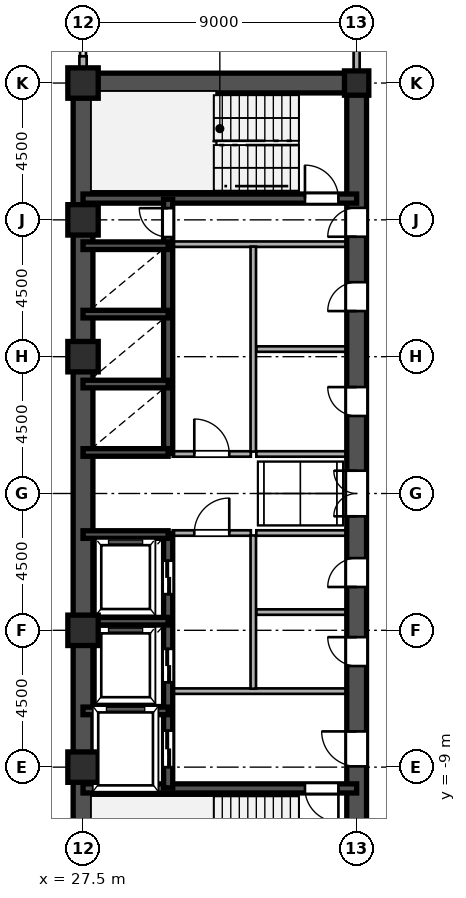
"""IFC4 building model, lengths in metres.
Left out: names, types, materials, properties, quantities, classifications, styles, units other than length and angle.
Written with IfcOpenShell. Run it as: python <this file> out.ifc"""

import sys

from ifc_helpers import new_model, si_unit, direction, frame, frame_2d, origin, origin_2d, place, context, subcontext, project, spatial, rectangle, hollow_rectangle, i_section, extrude, source, transform, mapped, element, fill, save


model = new_model("IFC4")
c1 = context("Model", 3, precision=1e-05, world=origin(), true_north=direction((0.0, 1.0)))
c2 = subcontext(c1, "Body", "Model", "MODEL_VIEW")
j1 = project(units=[si_unit("LENGTHUNIT", "METRE"), si_unit("PLANEANGLEUNIT", "RADIAN")], contexts=[c1])
p1 = place(None, origin())
s1 = spatial("IfcSite", under=j1, at=p1, CompositionType="ELEMENT")
p2 = place(p1, origin())
s2 = spatial("IfcBuilding", under=s1, at=p2, CompositionType="ELEMENT")
p3 = place(p2, frame((0.0, 0.0, 96.0)))
s3 = spatial("IfcBuildingStorey", under=s2, at=p3, CompositionType="ELEMENT", Elevation=96.0)
m1 = source(origin(), c2, "Body", "SweptSolid", [
    extrude(hollow_rectangle(XDim=1.0, YDim=1.0, WallThickness=0.042, at=origin_2d()), origin(), (0.0, 0.0, 1.0), 3.6),
])
for number, where, z_axis, x_axis in (
    (1, (27.5, -9.0, 0.0), (0.0, 0.0, 1.0), (1.0, 0.0, 0.0)),
    (2, (27.5, -4.5, 0.0), (0.0, 0.0, 1.0), (1.0, 0.0, 0.0)),
    (3, (27.5, 4.5, 0.0), (0.0, 0.0, 1.0), (1.0, 0.0, 0.0)),
    (4, (27.5, 9.0, 0.0), (0.0, 0.0, 1.0), (1.0, 0.0, 0.0)),
    (5, (27.5, 13.5, 0.0), (0.0, 0.0, 1.0), (1.0, 0.0, 0.0)),
):
    element("IfcColumn", number, at=place(p3, frame(where, z_axis=z_axis, x_axis=x_axis)), inside=s3, PredefinedType="COLUMN", context=c2, shape_type="MappedRepresentation", body=[
        mapped(m1, transform((0.0, 0.0, 0.0), scale=1.0)),
    ])
m2 = source(origin(), c2, "Body", "SweptSolid", [
    extrude(i_section(OverallWidth=0.8, OverallDepth=0.8, WebThickness=0.032, FlangeThickness=0.05, at=origin_2d()), origin(), (0.0, 0.0, 1.0), 3.6),
])
p4 = place(p3, frame((36.5, 13.5, 0.0), z_axis=(0.0, 0.0, 1.0), x_axis=(1.0, 0.0, 0.0)))
e6 = element("IfcColumn", 6, at=p4, inside=s3, PredefinedType="COLUMN", context=c2, shape_type="MappedRepresentation", body=[
    mapped(m2, transform((0.0, 0.0, 0.0), scale=1.0)),
])
p5 = place(p3, frame((27.5, 13.83, 0.0), z_axis=(0.0, 0.0, 1.0), x_axis=(0.0, 1.0, 0.0)))
e7 = element("IfcWall", 7, at=p5, inside=s3, PredefinedType="SOLIDWALL", context=c2, shape_type="SweptSolid", body=[
    extrude(rectangle(XDim=0.55, YDim=0.24, at=frame_2d((0.275, 0.0))), origin(), (0.0, 0.0, 1.0), 2.88),
])
for number, where, z_axis, x_axis in (
    (8, (27.5, -13.5, 0.0), (0.0, 0.0, 1.0), (0.0, 1.0, 0.0)),
    (9, (27.5, 1.3, 0.0), (0.0, 0.0, 1.0), (0.0, 1.0, 0.0)),
):
    element("IfcWall", number, at=place(p3, frame(where, z_axis=z_axis, x_axis=x_axis)), inside=s3, PredefinedType="SHEAR", context=c2, shape_type="SweptSolid", body=[
        extrude(rectangle(XDim=12.2, YDim=0.65, at=frame_2d((6.1, 0.0))), origin(), (0.0, 0.0, 1.0), 3.38),
    ])
p6 = place(p3, frame((27.5, -1.3, 0.0), z_axis=(0.0, 0.0, 1.0), x_axis=(0.0, 1.0, 0.0)))
e10 = element("IfcWall", 10, at=p6, inside=s3, PredefinedType="SHEAR", context=c2, shape_type="SweptSolid", body=[
    extrude(rectangle(XDim=2.6, YDim=0.65, at=frame_2d((1.3, 0.0))), origin(), (0.0, 0.0, 1.0), 3.38),
])
p7 = place(p3, frame((27.5, 13.5, 0.0), z_axis=(0.0, 0.0, 1.0), x_axis=(1.0, 0.0, 0.0)))
e11 = element("IfcWall", 11, at=p7, inside=s3, PredefinedType="SHEAR", context=c2, shape_type="SweptSolid", body=[
    extrude(rectangle(XDim=9.0, YDim=0.65, at=frame_2d((4.5, 0.0))), origin(), (0.0, 0.0, 1.0), 3.38),
])
p8 = place(p3, frame((36.5, -13.65, 0.0), z_axis=(0.0, 0.0, 1.0), x_axis=(0.0, 1.0, 0.0)))
e12 = element("IfcWall", 12, at=p8, inside=s3, PredefinedType="SHEAR", context=c2, shape_type="SweptSolid", body=[
    extrude(rectangle(XDim=7.15, YDim=0.65, at=frame_2d((3.575, 0.0))), origin(), (0.0, 0.0, 1.0), 3.38),
])
p9 = place(p8, frame((4.675, 0.0, 0.0)))
e13 = element("IfcOpeningElement", 13, at=p9, cuts=e12, PredefinedType="OPENING", context=c2, shape_type="SweptSolid", body=[
    extrude(rectangle(XDim=1.15, YDim=2.2, at=frame_2d((0.575, 1.1))), frame((0.0, 0.335, 0.0), z_axis=(0.0, -1.0, 0.0), x_axis=(1.0, 0.0, 0.0)), (0.0, 0.0, 1.0), 0.67),
])
p10 = place(p3, frame((36.5, -1.3, 0.0), z_axis=(0.0, 0.0, 1.0), x_axis=(0.0, 1.0, 0.0)))
e14 = element("IfcWall", 14, at=p10, inside=s3, PredefinedType="SHEAR", context=c2, shape_type="SweptSolid", body=[
    extrude(rectangle(XDim=2.6, YDim=0.65, at=frame_2d((1.3, 0.0))), origin(), (0.0, 0.0, 1.0), 3.38),
])
p11 = place(p10, frame((0.55, 0.0, 0.0)))
e15 = element("IfcOpeningElement", 15, at=p11, cuts=e14, PredefinedType="OPENING", context=c2, shape_type="SweptSolid", body=[
    extrude(rectangle(XDim=1.5, YDim=2.3, at=frame_2d((0.75, 1.15))), frame((0.0, 0.335, 0.0), z_axis=(0.0, -1.0, 0.0), x_axis=(1.0, 0.0, 0.0)), (0.0, 0.0, 1.0), 0.67),
])
p12 = place(p3, frame((36.5, 8.2, 0.0), z_axis=(0.0, 0.0, 1.0), x_axis=(0.0, 1.0, 0.0)))
e16 = element("IfcWall", 16, at=p12, inside=s3, PredefinedType="SHEAR", context=c2, shape_type="SweptSolid", body=[
    extrude(rectangle(XDim=5.45, YDim=0.65, at=frame_2d((2.725, 0.0))), origin(), (0.0, 0.0, 1.0), 3.38),
])
p13 = place(p12, frame((0.245, 0.0, 0.0)))
e17 = element("IfcOpeningElement", 17, at=p13, cuts=e16, PredefinedType="OPENING", context=c2, shape_type="SweptSolid", body=[
    extrude(rectangle(XDim=0.95, YDim=2.15, at=frame_2d((0.475, 1.075))), frame((0.0, 0.335, 0.0), z_axis=(0.0, -1.0, 0.0), x_axis=(1.0, 0.0, 0.0)), (0.0, 0.0, 1.0), 0.67),
])
p14 = place(p3, frame((36.5, -6.5, 0.0), z_axis=(0.0, 0.0, 1.0), x_axis=(0.0, 1.0, 0.0)))
e18 = element("IfcWall", 18, at=p14, inside=s3, PredefinedType="SHEAR", context=c2, shape_type="SweptSolid", body=[
    extrude(rectangle(XDim=2.6, YDim=0.65, at=frame_2d((1.3, 0.0))), origin(), (0.0, 0.0, 1.0), 3.38),
])
p15 = place(p14, frame((0.825, 0.0, 0.0)))
e19 = element("IfcOpeningElement", 19, at=p15, cuts=e18, PredefinedType="OPENING", context=c2, shape_type="SweptSolid", body=[
    extrude(rectangle(XDim=0.95, YDim=2.15, at=frame_2d((0.475, 1.075))), frame((0.0, 0.335, 0.0), z_axis=(0.0, -1.0, 0.0), x_axis=(1.0, 0.0, 0.0)), (0.0, 0.0, 1.0), 0.67),
])
p16 = place(p3, frame((36.5, -3.9, 0.0), z_axis=(0.0, 0.0, 1.0), x_axis=(0.0, 1.0, 0.0)))
e20 = element("IfcWall", 20, at=p16, inside=s3, PredefinedType="SHEAR", context=c2, shape_type="SweptSolid", body=[
    extrude(rectangle(XDim=2.6, YDim=0.65, at=frame_2d((1.3, 0.0))), origin(), (0.0, 0.0, 1.0), 3.38),
])
p17 = place(p16, frame((0.825, 0.0, 0.0)))
e21 = element("IfcOpeningElement", 21, at=p17, cuts=e20, PredefinedType="OPENING", context=c2, shape_type="SweptSolid", body=[
    extrude(rectangle(XDim=0.95, YDim=2.15, at=frame_2d((0.475, 1.075))), frame((0.0, 0.335, 0.0), z_axis=(0.0, -1.0, 0.0), x_axis=(1.0, 0.0, 0.0)), (0.0, 0.0, 1.0), 0.67),
])
p18 = place(p3, frame((36.5, 1.3, 0.0), z_axis=(0.0, 0.0, 1.0), x_axis=(0.0, 1.0, 0.0)))
e22 = element("IfcWall", 22, at=p18, inside=s3, PredefinedType="SHEAR", context=c2, shape_type="SweptSolid", body=[
    extrude(rectangle(XDim=3.45, YDim=0.65, at=frame_2d((1.725, 0.0))), origin(), (0.0, 0.0, 1.0), 3.38),
])
p19 = place(p18, frame((1.25, 0.0, 0.0)))
e23 = element("IfcOpeningElement", 23, at=p19, cuts=e22, PredefinedType="OPENING", context=c2, shape_type="SweptSolid", body=[
    extrude(rectangle(XDim=0.95, YDim=2.15, at=frame_2d((0.475, 1.075))), frame((0.0, 0.335, 0.0), z_axis=(0.0, -1.0, 0.0), x_axis=(1.0, 0.0, 0.0)), (0.0, 0.0, 1.0), 0.67),
])
p20 = place(p3, frame((36.5, 4.75, 0.0), z_axis=(0.0, 0.0, 1.0), x_axis=(0.0, 1.0, 0.0)))
e24 = element("IfcWall", 24, at=p20, inside=s3, PredefinedType="SHEAR", context=c2, shape_type="SweptSolid", body=[
    extrude(rectangle(XDim=3.45, YDim=0.65, at=frame_2d((1.725, 0.0))), origin(), (0.0, 0.0, 1.0), 3.38),
])
p21 = place(p20, frame((1.25, 0.0, 0.0)))
e25 = element("IfcOpeningElement", 25, at=p21, cuts=e24, PredefinedType="OPENING", context=c2, shape_type="SweptSolid", body=[
    extrude(rectangle(XDim=0.95, YDim=2.15, at=frame_2d((0.475, 1.075))), frame((0.0, 0.335, 0.0), z_axis=(0.0, -1.0, 0.0), x_axis=(1.0, 0.0, 0.0)), (0.0, 0.0, 1.0), 0.67),
])
p22 = place(p3, frame((27.5, -9.7, 0.0), z_axis=(0.0, 0.0, 1.0), x_axis=(1.0, 0.0, 0.0)))
e26 = element("IfcWall", 26, at=p22, inside=s3, PredefinedType="SHEAR", context=c2, shape_type="SweptSolid", body=[
    extrude(rectangle(XDim=9.0, YDim=0.3, at=frame_2d((4.5, 0.0))), origin(), (0.0, 0.0, 1.0), 3.38),
])
p23 = place(p22, frame((7.3, 0.0, 0.0)))
e27 = element("IfcOpeningElement", 27, at=p23, cuts=e26, PredefinedType="OPENING", context=c2, shape_type="SweptSolid", body=[
    extrude(rectangle(XDim=1.1, YDim=2.2, at=frame_2d((0.55, 1.1))), frame((0.0, 0.16, 0.0), z_axis=(0.0, -1.0, 0.0), x_axis=(1.0, 0.0, 0.0)), (0.0, 0.0, 1.0), 0.32),
])
p24 = place(p3, frame((27.5, 9.7, 0.0), z_axis=(0.0, 0.0, 1.0), x_axis=(1.0, 0.0, 0.0)))
e28 = element("IfcWall", 28, at=p24, inside=s3, PredefinedType="SHEAR", context=c2, shape_type="SweptSolid", body=[
    extrude(rectangle(XDim=9.0, YDim=0.3, at=frame_2d((4.5, 0.0))), origin(), (0.0, 0.0, 1.0), 3.38),
])
p25 = place(p24, frame((7.3, 0.0, 0.0)))
e29 = element("IfcOpeningElement", 29, at=p25, cuts=e28, PredefinedType="OPENING", context=c2, shape_type="SweptSolid", body=[
    extrude(rectangle(XDim=1.1, YDim=2.2, at=frame_2d((0.55, 1.1))), frame((0.0, 0.16, 0.0), z_axis=(0.0, -1.0, 0.0), x_axis=(1.0, 0.0, 0.0)), (0.0, 0.0, 1.0), 0.32),
])
for number, where, z_axis, x_axis in (
    (30, (27.5, -7.15, 0.0), (0.0, 0.0, 1.0), (1.0, 0.0, 0.0)),
    (31, (27.5, -4.2, 0.0), (0.0, 0.0, 1.0), (1.0, 0.0, 0.0)),
    (32, (27.5, -1.35, 0.0), (0.0, 0.0, 1.0), (1.0, 0.0, 0.0)),
    (33, (27.5, 1.35, 0.0), (0.0, 0.0, 1.0), (1.0, 0.0, 0.0)),
    (34, (27.5, 3.6, 0.0), (0.0, 0.0, 1.0), (1.0, 0.0, 0.0)),
    (35, (27.5, 5.9, 0.0), (0.0, 0.0, 1.0), (1.0, 0.0, 0.0)),
    (36, (27.5, 8.15, 0.0), (0.0, 0.0, 1.0), (1.0, 0.0, 0.0)),
):
    element("IfcWall", number, at=place(p3, frame(where, z_axis=z_axis, x_axis=x_axis)), inside=s3, PredefinedType="SHEAR", context=c2, shape_type="SweptSolid", body=[
        extrude(rectangle(XDim=2.8, YDim=0.25, at=frame_2d((1.4, 0.0))), origin(), (0.0, 0.0, 1.0), 3.38),
    ])
p26 = place(p3, frame((30.3, -9.68, 0.0), z_axis=(0.0, 0.0, 1.0), x_axis=(0.0, 1.0, 0.0)))
e37 = element("IfcWall", 37, at=p26, inside=s3, PredefinedType="SHEAR", context=c2, shape_type="SweptSolid", body=[
    extrude(rectangle(XDim=2.56, YDim=0.3, at=frame_2d((1.28, 0.0))), origin(), (0.0, 0.0, 1.0), 3.38),
])
p27 = place(p26, frame((0.68, 0.0, 0.0)))
e38 = element("IfcOpeningElement", 38, at=p27, cuts=e37, PredefinedType="OPENING", context=c2, shape_type="SweptSolid", body=[
    extrude(rectangle(XDim=1.2, YDim=2.25, at=frame_2d((0.6, 1.125))), frame((0.0, 0.16, 0.0), z_axis=(0.0, -1.0, 0.0), x_axis=(1.0, 0.0, 0.0)), (0.0, 0.0, 1.0), 0.32),
])
p28 = place(p3, frame((30.3, -7.12, 0.0), z_axis=(0.0, 0.0, 1.0), x_axis=(0.0, 1.0, 0.0)))
e39 = element("IfcWall", 39, at=p28, inside=s3, PredefinedType="SHEAR", context=c2, shape_type="SweptSolid", body=[
    extrude(rectangle(XDim=2.92, YDim=0.3, at=frame_2d((1.46, 0.0))), origin(), (0.0, 0.0, 1.0), 3.38),
])
p29 = place(p28, frame((0.91, 0.0, 0.0)))
e40 = element("IfcOpeningElement", 40, at=p29, cuts=e39, PredefinedType="OPENING", context=c2, shape_type="SweptSolid", body=[
    extrude(rectangle(XDim=1.1, YDim=2.2, at=frame_2d((0.55, 1.1))), frame((0.0, 0.16, 0.0), z_axis=(0.0, -1.0, 0.0), x_axis=(1.0, 0.0, 0.0)), (0.0, 0.0, 1.0), 0.32),
])
p30 = place(p3, frame((30.3, -4.2, 0.0), z_axis=(0.0, 0.0, 1.0), x_axis=(0.0, 1.0, 0.0)))
e41 = element("IfcWall", 41, at=p30, inside=s3, PredefinedType="SHEAR", context=c2, shape_type="SweptSolid", body=[
    extrude(rectangle(XDim=2.88, YDim=0.3, at=frame_2d((1.44, 0.0))), origin(), (0.0, 0.0, 1.0), 3.38),
])
p31 = place(p30, frame((0.89, 0.0, 0.0)))
e42 = element("IfcOpeningElement", 42, at=p31, cuts=e41, PredefinedType="OPENING", context=c2, shape_type="SweptSolid", body=[
    extrude(rectangle(XDim=1.1, YDim=2.2, at=frame_2d((0.55, 1.1))), frame((0.0, 0.16, 0.0), z_axis=(0.0, -1.0, 0.0), x_axis=(1.0, 0.0, 0.0)), (0.0, 0.0, 1.0), 0.32),
])
p32 = place(p3, frame((30.3, 1.32, 0.0), z_axis=(0.0, 0.0, 1.0), x_axis=(0.0, 1.0, 0.0)))
e43 = element("IfcWall", 43, at=p32, inside=s3, PredefinedType="SHEAR", context=c2, shape_type="SweptSolid", body=[
    extrude(rectangle(XDim=2.28, YDim=0.3, at=frame_2d((1.14, 0.0))), origin(), (0.0, 0.0, 1.0), 3.38),
])
p33 = place(p3, frame((30.3, 3.6, 0.0), z_axis=(0.0, 0.0, 1.0), x_axis=(0.0, 1.0, 0.0)))
e44 = element("IfcWall", 44, at=p33, inside=s3, PredefinedType="SHEAR", context=c2, shape_type="SweptSolid", body=[
    extrude(rectangle(XDim=2.3, YDim=0.3, at=frame_2d((1.15, 0.0))), origin(), (0.0, 0.0, 1.0), 3.38),
])
p34 = place(p3, frame((30.3, 5.9, 0.0), z_axis=(0.0, 0.0, 1.0), x_axis=(0.0, 1.0, 0.0)))
e45 = element("IfcWall", 45, at=p34, inside=s3, PredefinedType="SHEAR", context=c2, shape_type="SweptSolid", body=[
    extrude(rectangle(XDim=2.25, YDim=0.3, at=frame_2d((1.125, 0.0))), origin(), (0.0, 0.0, 1.0), 3.38),
])
p35 = place(p3, frame((30.3, 8.15, 0.0), z_axis=(0.0, 0.0, 1.0), x_axis=(0.0, 1.0, 0.0)))
e46 = element("IfcWall", 46, at=p35, inside=s3, PredefinedType="SHEAR", context=c2, shape_type="SweptSolid", body=[
    extrude(rectangle(XDim=1.53, YDim=0.3, at=frame_2d((0.765, 0.0))), origin(), (0.0, 0.0, 1.0), 3.38),
])
p36 = place(p35, frame((0.285, 0.0, 0.0)))
e47 = element("IfcOpeningElement", 47, at=p36, cuts=e46, PredefinedType="OPENING", context=c2, shape_type="SweptSolid", body=[
    extrude(rectangle(XDim=0.95, YDim=2.15, at=frame_2d((0.475, 1.075))), frame((0.0, 0.16, 0.0), z_axis=(0.0, -1.0, 0.0), x_axis=(1.0, 0.0, 0.0)), (0.0, 0.0, 1.0), 0.32),
])
for number, where, z_axis, x_axis in (
    (48, (30.45, -6.5, 0.0), (0.0, 0.0, 1.0), (1.0, 0.0, 0.0)),
    (49, (30.45, 8.2, 0.0), (0.0, 0.0, 1.0), (1.0, 0.0, 0.0)),
):
    element("IfcWall", number, at=place(p3, frame(where, z_axis=z_axis, x_axis=x_axis)), inside=s3, PredefinedType="PARTITIONING", context=c2, shape_type="SweptSolid", body=[
        extrude(rectangle(XDim=5.7, YDim=0.18, at=frame_2d((2.85, 0.0))), origin(), (0.0, 0.0, 1.0), 3.38),
    ])
p37 = place(p3, frame((33.1, -6.42, 0.0), z_axis=(0.0, 0.0, 1.0), x_axis=(0.0, 1.0, 0.0)))
e50 = element("IfcWall", 50, at=p37, inside=s3, PredefinedType="PARTITIONING", context=c2, shape_type="SweptSolid", body=[
    extrude(rectangle(XDim=5.04, YDim=0.18, at=frame_2d((2.52, 0.0))), origin(), (0.0, 0.0, 1.0), 3.38),
])
p38 = place(p3, frame((33.1, 1.38, 0.0), z_axis=(0.0, 0.0, 1.0), x_axis=(0.0, 1.0, 0.0)))
e51 = element("IfcWall", 51, at=p38, inside=s3, PredefinedType="PARTITIONING", context=c2, shape_type="SweptSolid", body=[
    extrude(rectangle(XDim=6.74, YDim=0.18, at=frame_2d((3.37, 0.0))), origin(), (0.0, 0.0, 1.0), 3.38),
])
p39 = place(p3, frame((30.45, -1.3, 0.0), z_axis=(0.0, 0.0, 1.0), x_axis=(1.0, 0.0, 0.0)))
e52 = element("IfcWall", 52, at=p39, inside=s3, PredefinedType="PARTITIONING", context=c2, shape_type="SweptSolid", body=[
    extrude(rectangle(XDim=2.57, YDim=0.18, at=frame_2d((1.285, 0.0))), origin(), (0.0, 0.0, 1.0), 3.38),
])
p40 = place(p39, frame((0.71, 0.0, 0.0)))
e53 = element("IfcOpeningElement", 53, at=p40, cuts=e52, PredefinedType="OPENING", context=c2, shape_type="SweptSolid", body=[
    extrude(rectangle(XDim=1.15, YDim=2.2, at=frame_2d((0.575, 1.1))), frame((0.0, 0.1, 0.0), z_axis=(0.0, -1.0, 0.0), x_axis=(1.0, 0.0, 0.0)), (0.0, 0.0, 1.0), 0.2),
])
p41 = place(p3, frame((30.45, 1.3, 0.0), z_axis=(0.0, 0.0, 1.0), x_axis=(1.0, 0.0, 0.0)))
e54 = element("IfcWall", 54, at=p41, inside=s3, PredefinedType="PARTITIONING", context=c2, shape_type="SweptSolid", body=[
    extrude(rectangle(XDim=2.57, YDim=0.18, at=frame_2d((1.285, 0.0))), origin(), (0.0, 0.0, 1.0), 3.38),
])
p42 = place(p41, frame((0.71, 0.0, 0.0)))
e55 = element("IfcOpeningElement", 55, at=p42, cuts=e54, PredefinedType="OPENING", context=c2, shape_type="SweptSolid", body=[
    extrude(rectangle(XDim=1.15, YDim=2.2, at=frame_2d((0.575, 1.1))), frame((0.0, 0.1, 0.0), z_axis=(0.0, -1.0, 0.0), x_axis=(1.0, 0.0, 0.0)), (0.0, 0.0, 1.0), 0.2),
])
for number, where, z_axis, x_axis in (
    (56, (33.2, -1.3, 0.0), (0.0, 0.0, 1.0), (1.0, 0.0, 0.0)),
    (57, (33.2, 1.3, 0.0), (0.0, 0.0, 1.0), (1.0, 0.0, 0.0)),
    (58, (33.2, -3.9, 0.0), (0.0, 0.0, 1.0), (1.0, 0.0, 0.0)),
    (59, (33.2, 4.75, 0.0), (0.0, 0.0, 1.0), (1.0, 0.0, 0.0)),
):
    element("IfcWall", number, at=place(p3, frame(where, z_axis=z_axis, x_axis=x_axis)), inside=s3, PredefinedType="PARTITIONING", context=c2, shape_type="SweptSolid", body=[
        extrude(rectangle(XDim=2.95, YDim=0.18, at=frame_2d((1.475, 0.0))), origin(), (0.0, 0.0, 1.0), 3.38),
    ])
p43 = place(p3, frame((36.5, 13.83, 0.0), z_axis=(0.0, 0.0, 1.0), x_axis=(0.0, 1.0, 0.0)))
e60 = element("IfcWall", 60, at=p43, inside=s3, PredefinedType="PARTITIONING", context=c2, shape_type="SweptSolid", body=[
    extrude(rectangle(XDim=1.685, YDim=0.2, at=frame_2d((0.842, 0.0))), origin(), (0.0, 0.0, 1.0), 2.68),
])
m3 = source(origin(), c2, "Body", "SweptSolid", [
    extrude(rectangle(XDim=1.15, YDim=2.2, at=frame_2d((0.575, 1.1))), frame((0.0, 0.025, 0.0), z_axis=(0.0, -1.0, 0.0), x_axis=(1.0, 0.0, 0.0)), (0.0, 0.0, 1.0), 0.05),
])
p44 = place(p9, origin())
e61 = element("IfcDoor", 61, at=p44, inside=s3, OperationType="SINGLE_SWING_RIGHT", PredefinedType="DOOR", context=c2, shape_type="MappedRepresentation", body=[
    mapped(m3, transform((0.0, 0.0, 0.0), scale=1.0)),
])
fill(e13, e61)
m4 = source(origin(), c2, "Body", "SweptSolid", [
    extrude(rectangle(XDim=1.5, YDim=2.3, at=frame_2d((0.75, 1.15))), frame((0.0, 0.025, 0.0), z_axis=(0.0, -1.0, 0.0), x_axis=(1.0, 0.0, 0.0)), (0.0, 0.0, 1.0), 0.05),
])
p45 = place(p11, origin())
e62 = element("IfcDoor", 62, at=p45, inside=s3, OperationType="DOUBLE_SWING_LEFT", PredefinedType="DOOR", context=c2, shape_type="MappedRepresentation", body=[
    mapped(m4, transform((0.0, 0.0, 0.0), scale=1.0)),
])
fill(e15, e62)
m5 = source(origin(), c2, "Body", "SweptSolid", [
    extrude(rectangle(XDim=0.95, YDim=2.15, at=frame_2d((0.475, 1.075))), frame((0.0, 0.025, 0.0), z_axis=(0.0, -1.0, 0.0), x_axis=(1.0, 0.0, 0.0)), (0.0, 0.0, 1.0), 0.05),
])
p46 = place(p13, origin())
e63 = element("IfcDoor", 63, at=p46, inside=s3, OperationType="SINGLE_SWING_LEFT", PredefinedType="DOOR", context=c2, shape_type="MappedRepresentation", body=[
    mapped(m5, transform((0.0, 0.0, 0.0), scale=1.0)),
])
fill(e17, e63)
p47 = place(p15, origin())
e64 = element("IfcDoor", 64, at=p47, inside=s3, OperationType="SINGLE_SWING_RIGHT", PredefinedType="DOOR", context=c2, shape_type="MappedRepresentation", body=[
    mapped(m5, transform((0.0, 0.0, 0.0), scale=1.0)),
])
fill(e19, e64)
p48 = place(p17, origin())
e65 = element("IfcDoor", 65, at=p48, inside=s3, OperationType="SINGLE_SWING_LEFT", PredefinedType="DOOR", context=c2, shape_type="MappedRepresentation", body=[
    mapped(m5, transform((0.0, 0.0, 0.0), scale=1.0)),
])
fill(e21, e65)
p49 = place(p19, origin())
e66 = element("IfcDoor", 66, at=p49, inside=s3, OperationType="SINGLE_SWING_RIGHT", PredefinedType="DOOR", context=c2, shape_type="MappedRepresentation", body=[
    mapped(m5, transform((0.0, 0.0, 0.0), scale=1.0)),
])
fill(e23, e66)
p50 = place(p21, origin())
e67 = element("IfcDoor", 67, at=p50, inside=s3, OperationType="SINGLE_SWING_LEFT", PredefinedType="DOOR", context=c2, shape_type="MappedRepresentation", body=[
    mapped(m5, transform((0.0, 0.0, 0.0), scale=1.0)),
])
fill(e25, e67)
m6 = source(origin(), c2, "Body", "SweptSolid", [
    extrude(rectangle(XDim=1.1, YDim=2.2, at=frame_2d((0.55, 1.1))), frame((0.0, 0.025, 0.0), z_axis=(0.0, -1.0, 0.0), x_axis=(1.0, 0.0, 0.0)), (0.0, 0.0, 1.0), 0.05),
])
p51 = place(p23, frame((1.1, 0.0, 0.0), z_axis=(0.0, 0.0, 1.0), x_axis=(-1.0, 0.0, 0.0)))
e68 = element("IfcDoor", 68, at=p51, inside=s3, OperationType="SINGLE_SWING_RIGHT", PredefinedType="DOOR", context=c2, shape_type="MappedRepresentation", body=[
    mapped(m6, transform((0.0, 0.0, 0.0), scale=1.0)),
])
fill(e27, e68)
p52 = place(p25, origin())
e69 = element("IfcDoor", 69, at=p52, inside=s3, OperationType="SINGLE_SWING_LEFT", PredefinedType="DOOR", context=c2, shape_type="MappedRepresentation", body=[
    mapped(m6, transform((0.0, 0.0, 0.0), scale=1.0)),
])
fill(e29, e69)
m7 = source(origin(), c2, "Body", "SweptSolid", [
    extrude(rectangle(XDim=1.2, YDim=2.25, at=frame_2d((0.6, 1.125))), frame((0.0, 0.025, 0.0), z_axis=(0.0, -1.0, 0.0), x_axis=(1.0, 0.0, 0.0)), (0.0, 0.0, 1.0), 0.05),
])
p53 = place(p27, origin())
e70 = element("IfcDoor", 70, at=p53, inside=s3, OperationType="DOUBLE_DOOR_SLIDING", PredefinedType="DOOR", context=c2, shape_type="MappedRepresentation", body=[
    mapped(m7, transform((0.0, 0.0, 0.0), scale=1.0)),
])
fill(e38, e70)
m8 = source(origin(), c2, "Body", "SweptSolid", [
    extrude(rectangle(XDim=1.1, YDim=2.2, at=frame_2d((0.55, 1.1))), frame((0.0, 0.025, 0.0), z_axis=(0.0, -1.0, 0.0), x_axis=(1.0, 0.0, 0.0)), (0.0, 0.0, 1.0), 0.05),
])
p54 = place(p29, origin())
e71 = element("IfcDoor", 71, at=p54, inside=s3, OperationType="DOUBLE_DOOR_SLIDING", PredefinedType="DOOR", context=c2, shape_type="MappedRepresentation", body=[
    mapped(m8, transform((0.0, 0.0, 0.0), scale=1.0)),
])
fill(e40, e71)
p55 = place(p31, origin())
e72 = element("IfcDoor", 72, at=p55, inside=s3, OperationType="DOUBLE_DOOR_SLIDING", PredefinedType="DOOR", context=c2, shape_type="MappedRepresentation", body=[
    mapped(m8, transform((0.0, 0.0, 0.0), scale=1.0)),
])
fill(e42, e72)
p56 = place(p36, origin())
e73 = element("IfcDoor", 73, at=p56, inside=s3, OperationType="SINGLE_SWING_RIGHT", PredefinedType="DOOR", context=c2, shape_type="MappedRepresentation", body=[
    mapped(m5, transform((0.0, 0.0, 0.0), scale=1.0)),
])
fill(e47, e73)
p57 = place(p40, origin())
e74 = element("IfcDoor", 74, at=p57, inside=s3, OperationType="SINGLE_SWING_RIGHT", PredefinedType="DOOR", context=c2, shape_type="MappedRepresentation", body=[
    mapped(m3, transform((0.0, 0.0, 0.0), scale=1.0)),
])
fill(e53, e74)
p58 = place(p42, origin())
e75 = element("IfcDoor", 75, at=p58, inside=s3, OperationType="SINGLE_SWING_LEFT", PredefinedType="DOOR", context=c2, shape_type="MappedRepresentation", body=[
    mapped(m3, transform((0.0, 0.0, 0.0), scale=1.0)),
])
fill(e55, e75)
save(model, sys.argv[1])
